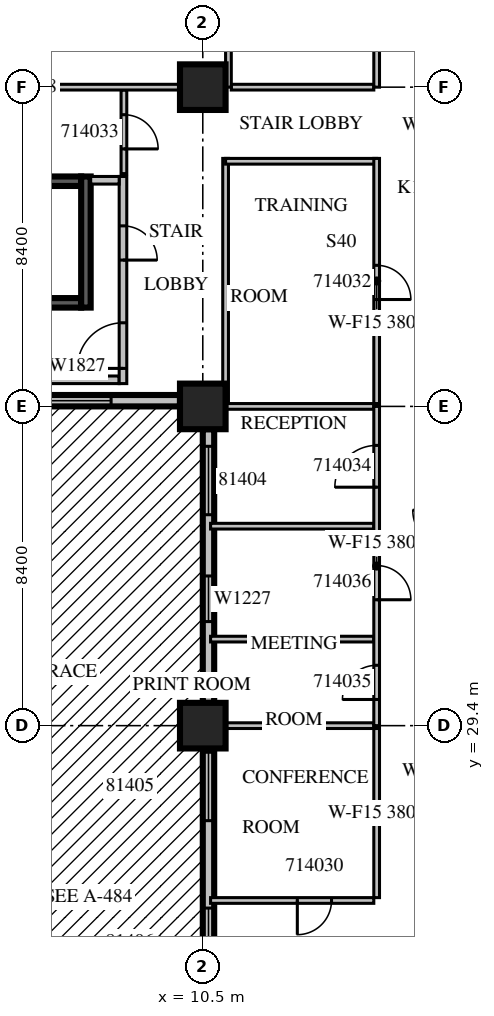
"""IFC4 building model, lengths in metres.
Left out: names, types, materials, properties, quantities, classifications, styles, units other than length and angle.
Written with IfcOpenShell. Run it as: python <this file> out.ifc"""

import sys

from ifc_helpers import new_model, si_unit, direction, frame, frame_2d, origin, origin_2d, place, context, subcontext, project, spatial, rectangle, extrude, source, transform, mapped, element, fill, save


model = new_model("IFC4")
c1 = context("Model", 3, precision=1e-05, world=origin(), true_north=direction((0.0, 1.0)))
c2 = subcontext(c1, "Body", "Model", "MODEL_VIEW")
j1 = project(units=[si_unit("LENGTHUNIT", "METRE"), si_unit("PLANEANGLEUNIT", "RADIAN")], contexts=[c1])
p1 = place(None, origin())
s1 = spatial("IfcSite", under=j1, at=p1, CompositionType="ELEMENT")
p2 = place(p1, origin())
s2 = spatial("IfcBuilding", under=s1, at=p2, CompositionType="ELEMENT")
p3 = place(p2, frame((0.0, 0.0, 69.9)))
s3 = spatial("IfcBuildingStorey", under=s2, at=p3, CompositionType="ELEMENT", Elevation=69.9)
m1 = source(origin(), c2, "Body", "SweptSolid", [
    extrude(rectangle(XDim=1.2, YDim=1.2, at=origin_2d()), origin(), (0.0, 0.0, 1.0), 4.2),
])
for number, where, z_axis, x_axis in (
    (1, (10.5, 29.4, 0.0), (0.0, 0.0, 1.0), (1.0, 0.0, 0.0)),
    (2, (10.5, 37.8, 0.0), (0.0, 0.0, 1.0), (1.0, 0.0, 0.0)),
    (3, (10.5, 46.2, 0.0), (0.0, 0.0, 1.0), (1.0, 0.0, 0.0)),
):
    element("IfcColumn", number, at=place(p3, frame(where, z_axis=z_axis, x_axis=x_axis)), inside=s3, PredefinedType="COLUMN", context=c2, shape_type="MappedRepresentation", body=[
        mapped(m1, transform((0.0, 0.0, 0.0), scale=1.0)),
    ])
m2 = source(origin(), c2, "Body", "SweptSolid", [
    extrude(rectangle(XDim=8.7, YDim=0.3, at=frame_2d((4.35, 0.0))), origin(), (0.0, 0.0, 1.0), 3.8),
])
p4 = place(p3, frame((1.2, 37.95, 0.0), z_axis=(0.0, 0.0, 1.0), x_axis=(1.0, 0.0, 0.0)))
e4 = element("IfcWall", 4, at=p4, inside=s3, PredefinedType="STANDARD", context=c2, shape_type="MappedRepresentation", body=[
    mapped(m2, transform((0.0, 0.0, 0.0), scale=1.0)),
])
m3 = source(origin(), c2, "Body", "SweptSolid", [
    extrude(rectangle(XDim=2.4, YDim=2.7, at=frame_2d((1.2, 1.35))), frame((0.0, 0.16, 0.0), z_axis=(0.0, -1.0, 0.0), x_axis=(1.0, 0.0, 0.0)), (0.0, 0.0, 1.0), 0.32),
])
p5 = place(p4, frame((0.225, 0.0, 0.6)))
e5 = element("IfcOpeningElement", 5, at=p5, cuts=e4, PredefinedType="OPENING", context=c2, shape_type="MappedRepresentation", body=[
    mapped(m3, transform((0.0, 0.0, 0.0), scale=1.0)),
])
m4 = source(origin(), c2, "Body", "SweptSolid", [
    extrude(rectangle(XDim=1.8, YDim=2.7, at=frame_2d((0.9, 1.35))), frame((0.0, 0.16, 0.0), z_axis=(0.0, -1.0, 0.0), x_axis=(1.0, 0.0, 0.0)), (0.0, 0.0, 1.0), 0.32),
])
p6 = place(p4, frame((5.088, 0.0, 0.6)))
e6 = element("IfcOpeningElement", 6, at=p6, cuts=e4, PredefinedType="OPENING", context=c2, shape_type="MappedRepresentation", body=[
    mapped(m4, transform((0.0, 0.0, 0.0), scale=1.0)),
])
m5 = source(origin(), c2, "Body", "SweptSolid", [
    extrude(rectangle(XDim=7.2, YDim=0.3, at=frame_2d((3.6, 0.0))), origin(), (0.0, 0.0, 1.0), 3.8),
])
p7 = place(p3, frame((10.65, 37.2, 0.0), z_axis=(0.0, 0.0, 1.0), x_axis=(0.0, -1.0, 0.0)))
e7 = element("IfcWall", 7, at=p7, inside=s3, PredefinedType="STANDARD", context=c2, shape_type="MappedRepresentation", body=[
    mapped(m5, transform((0.0, 0.0, 0.0), scale=1.0)),
])
m6 = source(origin(), c2, "Body", "SweptSolid", [
    extrude(rectangle(XDim=1.8, YDim=2.4, at=frame_2d((0.9, 1.2))), frame((0.0, 0.16, 0.0), z_axis=(0.0, -1.0, 0.0), x_axis=(1.0, 0.0, 0.0)), (0.0, 0.0, 1.0), 0.32),
])
p8 = place(p7, frame((0.45, 0.0, 0.0)))
e8 = element("IfcOpeningElement", 8, at=p8, cuts=e7, PredefinedType="OPENING", context=c2, shape_type="MappedRepresentation", body=[
    mapped(m6, transform((0.0, 0.0, 0.0), scale=1.0)),
])
m7 = source(origin(), c2, "Body", "SweptSolid", [
    extrude(rectangle(XDim=1.2, YDim=2.7, at=frame_2d((0.6, 1.35))), frame((0.0, 0.16, 0.0), z_axis=(0.0, -1.0, 0.0), x_axis=(1.0, 0.0, 0.0)), (0.0, 0.0, 1.0), 0.32),
])
p9 = place(p7, frame((3.861, 0.0, 0.6)))
e9 = element("IfcOpeningElement", 9, at=p9, cuts=e7, PredefinedType="OPENING", context=c2, shape_type="MappedRepresentation", body=[
    mapped(m7, transform((0.0, 0.0, 0.0), scale=1.0)),
])
m8 = source(origin(), c2, "Body", "SweptSolid", [
    extrude(rectangle(XDim=6.6, YDim=0.3, at=frame_2d((3.3, 0.0))), origin(), (0.0, 0.0, 1.0), 3.8),
])
p10 = place(p3, frame((10.65, 28.8, 0.0), z_axis=(0.0, 0.0, 1.0), x_axis=(0.0, -1.0, 0.0)))
e10 = element("IfcWall", 10, at=p10, inside=s3, PredefinedType="STANDARD", context=c2, shape_type="MappedRepresentation", body=[
    mapped(m8, transform((0.0, 0.0, 0.0), scale=1.0)),
])
p11 = place(p10, frame((0.1, 0.0, 0.0)))
e11 = element("IfcOpeningElement", 11, at=p11, cuts=e10, PredefinedType="OPENING", context=c2, shape_type="MappedRepresentation", body=[
    mapped(m6, transform((0.0, 0.0, 0.0), scale=1.0)),
])
p12 = place(p10, frame((4.2, 0.0, 0.0)))
e12 = element("IfcOpeningElement", 12, at=p12, cuts=e10, PredefinedType="OPENING", context=c2, shape_type="MappedRepresentation", body=[
    mapped(m6, transform((0.0, 0.0, 0.0), scale=1.0)),
])
m9 = source(origin(), c2, "Body", "SweptSolid", [
    extrude(rectangle(XDim=7.0, YDim=0.25, at=frame_2d((3.5, 0.0))), origin(), (0.0, 0.0, 1.0), 3.8),
])
p13 = place(p3, frame((0.3, 40.525, 0.0), z_axis=(0.0, 0.0, 1.0), x_axis=(1.0, 0.0, 0.0)))
e13 = element("IfcWall", 13, at=p13, inside=s3, PredefinedType="SOLIDWALL", context=c2, shape_type="MappedRepresentation", body=[
    mapped(m9, transform((0.0, 0.0, 0.0), scale=1.0)),
])
m10 = source(origin(), c2, "Body", "SweptSolid", [
    extrude(rectangle(XDim=1.1, YDim=2.1, at=frame_2d((0.55, 1.05))), frame((0.0, 0.135, 0.0), z_axis=(0.0, -1.0, 0.0), x_axis=(1.0, 0.0, 0.0)), (0.0, 0.0, 1.0), 0.27),
])
p14 = place(p13, frame((0.55, 0.0, 0.0)))
e14 = element("IfcOpeningElement", 14, at=p14, cuts=e13, PredefinedType="OPENING", context=c2, shape_type="MappedRepresentation", body=[
    mapped(m10, transform((0.0, 0.0, 0.0), scale=1.0)),
])
p15 = place(p3, frame((0.3, 43.725, 0.0), z_axis=(0.0, 0.0, 1.0), x_axis=(1.0, 0.0, 0.0)))
e15 = element("IfcWall", 15, at=p15, inside=s3, PredefinedType="SOLIDWALL", context=c2, shape_type="MappedRepresentation", body=[
    mapped(m9, transform((0.0, 0.0, 0.0), scale=1.0)),
])
m11 = source(origin(), c2, "Body", "SweptSolid", [
    extrude(rectangle(XDim=3.45, YDim=0.25, at=frame_2d((1.725, 0.0))), origin(), (0.0, 0.0, 1.0), 3.8),
])
p16 = place(p3, frame((7.425, 40.4, 0.0), z_axis=(0.0, 0.0, 1.0), x_axis=(0.0, 1.0, 0.0)))
e16 = element("IfcWall", 16, at=p16, inside=s3, PredefinedType="SOLIDWALL", context=c2, shape_type="MappedRepresentation", body=[
    mapped(m11, transform((0.0, 0.0, 0.0), scale=1.0)),
])
m12 = source(origin(), c2, "Body", "SweptSolid", [
    extrude(rectangle(XDim=8.0, YDim=0.2, at=frame_2d((4.0, 0.0))), origin(), (0.0, 0.0, 1.0), 3.8),
])
p17 = place(p3, frame((0.3, 38.5, 0.0), z_axis=(0.0, 0.0, 1.0), x_axis=(1.0, 0.0, 0.0)))
e17 = element("IfcWall", 17, at=p17, inside=s3, PredefinedType="PARTITIONING", context=c2, shape_type="MappedRepresentation", body=[
    mapped(m12, transform((0.0, 0.0, 0.0), scale=1.0)),
])
m13 = source(origin(), c2, "Body", "SweptSolid", [
    extrude(rectangle(XDim=5.45, YDim=0.2, at=frame_2d((2.725, 0.0))), origin(), (0.0, 0.0, 1.0), 3.8),
])
p18 = place(p3, frame((8.4, 38.4, 0.0), z_axis=(0.0, 0.0, 1.0), x_axis=(0.0, 1.0, 0.0)))
e18 = element("IfcWall", 18, at=p18, inside=s3, PredefinedType="PARTITIONING", context=c2, shape_type="MappedRepresentation", body=[
    mapped(m13, transform((0.0, 0.0, 0.0), scale=1.0)),
])
m14 = source(origin(), c2, "Body", "SweptSolid", [
    extrude(rectangle(XDim=1.2, YDim=2.1, at=frame_2d((0.6, 1.05))), frame((0.0, 0.11, 0.0), z_axis=(0.0, -1.0, 0.0), x_axis=(1.0, 0.0, 0.0)), (0.0, 0.0, 1.0), 0.22),
])
p19 = place(p18, frame((0.4, 0.0, 0.0)))
e19 = element("IfcOpeningElement", 19, at=p19, cuts=e18, PredefinedType="OPENING", context=c2, shape_type="MappedRepresentation", body=[
    mapped(m14, transform((0.0, 0.0, 0.0), scale=1.0)),
])
m15 = source(origin(), c2, "Body", "SweptSolid", [
    extrude(rectangle(XDim=0.9, YDim=2.1, at=frame_2d((0.45, 1.05))), frame((0.0, 0.11, 0.0), z_axis=(0.0, -1.0, 0.0), x_axis=(1.0, 0.0, 0.0)), (0.0, 0.0, 1.0), 0.22),
])
p20 = place(p18, frame((3.25, 0.0, 0.0)))
e20 = element("IfcOpeningElement", 20, at=p20, cuts=e18, PredefinedType="OPENING", context=c2, shape_type="MappedRepresentation", body=[
    mapped(m15, transform((0.0, 0.0, 0.0), scale=1.0)),
])
m16 = source(origin(), c2, "Body", "SweptSolid", [
    extrude(rectangle(XDim=0.75, YDim=0.2, at=frame_2d((0.375, 0.0))), origin(), (0.0, 0.0, 1.0), 3.8),
])
p21 = place(p3, frame((7.55, 43.75, 0.0), z_axis=(0.0, 0.0, 1.0), x_axis=(1.0, 0.0, 0.0)))
e21 = element("IfcWall", 21, at=p21, inside=s3, PredefinedType="PARTITIONING", context=c2, shape_type="MappedRepresentation", body=[
    mapped(m16, transform((0.0, 0.0, 0.0), scale=1.0)),
])
m17 = source(origin(), c2, "Body", "SweptSolid", [
    extrude(rectangle(XDim=4.295, YDim=0.15, at=frame_2d((2.147, 0.0))), origin(), (0.0, 0.0, 1.0), 3.8),
])
p22 = place(p3, frame((10.705, 24.8, 0.0), z_axis=(0.0, 0.0, 1.0), x_axis=(1.0, 0.0, 0.0)))
e22 = element("IfcWall", 22, at=p22, inside=s3, PredefinedType="PARTITIONING", context=c2, shape_type="MappedRepresentation", body=[
    mapped(m17, transform((0.0, 0.0, 0.0), scale=1.0)),
])
m18 = source(origin(), c2, "Body", "SweptSolid", [
    extrude(rectangle(XDim=0.9, YDim=2.1, at=frame_2d((0.45, 1.05))), frame((0.0, 0.085, 0.0), z_axis=(0.0, -1.0, 0.0), x_axis=(1.0, 0.0, 0.0)), (0.0, 0.0, 1.0), 0.17),
])
p23 = place(p22, frame((2.283, 0.0, 0.0)))
e23 = element("IfcOpeningElement", 23, at=p23, cuts=e22, PredefinedType="OPENING", context=c2, shape_type="MappedRepresentation", body=[
    mapped(m18, transform((0.0, 0.0, 0.0), scale=1.0)),
])
m19 = source(origin(), c2, "Body", "SweptSolid", [
    extrude(rectangle(XDim=4.45, YDim=0.15, at=frame_2d((2.225, 0.0))), origin(), (0.0, 0.0, 1.0), 3.8),
])
p24 = place(p3, frame((15.075, 24.875, 0.0), z_axis=(0.0, 0.0, 1.0), x_axis=(0.0, 1.0, 0.0)))
e24 = element("IfcWall", 24, at=p24, inside=s3, PredefinedType="PARTITIONING", context=c2, shape_type="MappedRepresentation", body=[
    mapped(m19, transform((0.0, 0.0, 0.0), scale=1.0)),
])
m20 = source(origin(), c2, "Body", "SweptSolid", [
    extrude(rectangle(XDim=3.901, YDim=0.15, at=frame_2d((1.95, 0.0))), origin(), (0.0, 0.0, 1.0), 3.8),
])
p25 = place(p3, frame((15.0, 29.4, 0.0), z_axis=(0.0, 0.0, 1.0), x_axis=(-1.0, 0.0, 0.0)))
e25 = element("IfcWall", 25, at=p25, inside=s3, PredefinedType="PARTITIONING", context=c2, shape_type="MappedRepresentation", body=[
    mapped(m20, transform((0.0, 0.0, 0.0), scale=1.0)),
])
m21 = source(origin(), c2, "Body", "SweptSolid", [
    extrude(rectangle(XDim=6.45, YDim=0.15, at=frame_2d((3.225, 0.0))), origin(), (0.0, 0.0, 1.0), 3.8),
])
p26 = place(p3, frame((11.1, 44.325, 0.0), z_axis=(0.0, 0.0, 1.0), x_axis=(0.0, -1.0, 0.0)))
e26 = element("IfcWall", 26, at=p26, inside=s3, PredefinedType="PARTITIONING", context=c2, shape_type="MappedRepresentation", body=[
    mapped(m21, transform((0.0, 0.0, 0.0), scale=1.0)),
])
m22 = source(origin(), c2, "Body", "SweptSolid", [
    extrude(rectangle(XDim=3.975, YDim=0.15, at=frame_2d((1.988, 0.0))), origin(), (0.0, 0.0, 1.0), 3.8),
])
p27 = place(p3, frame((15.075, 44.25, 0.0), z_axis=(0.0, 0.0, 1.0), x_axis=(-1.0, 0.0, 0.0)))
e27 = element("IfcWall", 27, at=p27, inside=s3, PredefinedType="PARTITIONING", context=c2, shape_type="MappedRepresentation", body=[
    mapped(m22, transform((0.0, 0.0, 0.0), scale=1.0)),
])
p28 = place(p3, frame((15.075, 37.875, 0.0), z_axis=(0.0, 0.0, 1.0), x_axis=(0.0, 1.0, 0.0)))
e28 = element("IfcWall", 28, at=p28, inside=s3, PredefinedType="PARTITIONING", context=c2, shape_type="MappedRepresentation", body=[
    mapped(m21, transform((0.0, 0.0, 0.0), scale=1.0)),
])
p29 = place(p28, frame((2.737, 0.0, 0.0)))
e29 = element("IfcOpeningElement", 29, at=p29, cuts=e28, PredefinedType="OPENING", context=c2, shape_type="MappedRepresentation", body=[
    mapped(m18, transform((0.0, 0.0, 0.0), scale=1.0)),
])
m23 = source(origin(), c2, "Body", "SweptSolid", [
    extrude(rectangle(XDim=2.2, YDim=0.15, at=frame_2d((1.1, 0.0))), origin(), (0.0, 0.0, 1.0), 3.8),
])
p30 = place(p3, frame((8.425, 43.925, 0.0), z_axis=(0.0, 0.0, 1.0), x_axis=(0.0, 1.0, 0.0)))
e30 = element("IfcWall", 30, at=p30, inside=s3, PredefinedType="PARTITIONING", context=c2, shape_type="MappedRepresentation", body=[
    mapped(m23, transform((0.0, 0.0, 0.0), scale=1.0)),
])
p31 = place(p30, frame((0.65, 0.0, 0.0)))
e31 = element("IfcOpeningElement", 31, at=p31, cuts=e30, PredefinedType="OPENING", context=c2, shape_type="MappedRepresentation", body=[
    mapped(m18, transform((0.0, 0.0, 0.0), scale=1.0)),
])
for number, where, z_axis, x_axis in (
    (32, (15.0, 31.677, 0.0), (0.0, 0.0, 1.0), (-1.0, 0.0, 0.0)),
    (33, (15.0, 34.648, 0.0), (0.0, 0.0, 1.0), (-1.0, 0.0, 0.0)),
):
    element("IfcWall", number, at=place(p3, frame(where, z_axis=z_axis, x_axis=x_axis)), inside=s3, PredefinedType="PARTITIONING", context=c2, shape_type="MappedRepresentation", body=[
        mapped(m17, transform((0.0, 0.0, 0.0), scale=1.0)),
    ])
p32 = place(p3, frame((15.0, 37.8, 0.0), z_axis=(0.0, 0.0, 1.0), x_axis=(-1.0, 0.0, 0.0)))
e34 = element("IfcWall", 34, at=p32, inside=s3, PredefinedType="PARTITIONING", context=c2, shape_type="MappedRepresentation", body=[
    mapped(m20, transform((0.0, 0.0, 0.0), scale=1.0)),
])
m24 = source(origin(), c2, "Body", "SweptSolid", [
    extrude(rectangle(XDim=8.702, YDim=0.15, at=frame_2d((4.351, 0.0))), origin(), (0.0, 0.0, 1.0), 3.8),
])
p33 = place(p3, frame((9.901, 46.2, 0.0), z_axis=(0.0, 0.0, 1.0), x_axis=(-1.0, 0.0, 0.0)))
e35 = element("IfcWall", 35, at=p33, inside=s3, PredefinedType="PARTITIONING", context=c2, shape_type="MappedRepresentation", body=[
    mapped(m24, transform((0.0, 0.0, 0.0), scale=1.0)),
])
m25 = source(origin(), c2, "Body", "SweptSolid", [
    extrude(rectangle(XDim=3.75, YDim=0.15, at=frame_2d((1.875, 0.0))), origin(), (0.0, 0.0, 1.0), 3.8),
])
p34 = place(p3, frame((15.0, 46.2, 0.0), z_axis=(0.0, 0.0, 1.0), x_axis=(-1.0, 0.0, 0.0)))
e36 = element("IfcWall", 36, at=p34, inside=s3, PredefinedType="PARTITIONING", context=c2, shape_type="MappedRepresentation", body=[
    mapped(m25, transform((0.0, 0.0, 0.0), scale=1.0)),
])
p35 = place(p3, frame((11.175, 46.2, 0.0), z_axis=(0.0, 0.0, 1.0), x_axis=(0.0, 1.0, 0.0)))
e37 = element("IfcWall", 37, at=p35, inside=s3, PredefinedType="PARTITIONING", context=c2, shape_type="SweptSolid", body=[
    extrude(rectangle(XDim=15.615, YDim=0.15, at=frame_2d((7.808, 0.0))), origin(), (0.0, 0.0, 1.0), 3.3),
])
p36 = place(p35, frame((2.487, 0.0, 0.0)))
e38 = element("IfcOpeningElement", 38, at=p36, cuts=e37, PredefinedType="OPENING", context=c2, shape_type="MappedRepresentation", body=[
    mapped(m18, transform((0.0, 0.0, 0.0), scale=1.0)),
])
p37 = place(p35, frame((8.367, 0.0, 0.0)))
e39 = element("IfcOpeningElement", 39, at=p37, cuts=e37, PredefinedType="OPENING", context=c2, shape_type="MappedRepresentation", body=[
    mapped(m18, transform((0.0, 0.0, 0.0), scale=1.0)),
])
p38 = place(p35, frame((13.512, 0.0, 0.0)))
e40 = element("IfcOpeningElement", 40, at=p38, cuts=e37, PredefinedType="OPENING", context=c2, shape_type="MappedRepresentation", body=[
    mapped(m18, transform((0.0, 0.0, 0.0), scale=1.0)),
])
m26 = source(origin(), c2, "Body", "SweptSolid", [
    extrude(rectangle(XDim=8.4, YDim=0.15, at=frame_2d((4.2, 0.0))), origin(), (0.0, 0.0, 1.0), 3.8),
])
p39 = place(p3, frame((15.075, 29.4, 0.0), z_axis=(0.0, 0.0, 1.0), x_axis=(0.0, 1.0, 0.0)))
e41 = element("IfcWall", 41, at=p39, inside=s3, PredefinedType="PARTITIONING", context=c2, shape_type="MappedRepresentation", body=[
    mapped(m26, transform((0.0, 0.0, 0.0), scale=1.0)),
])
m27 = source(origin(), c2, "Body", "SweptSolid", [
    extrude(rectangle(XDim=1.1, YDim=2.1, at=frame_2d((0.55, 1.05))), frame((0.0, 0.085, 0.0), z_axis=(0.0, -1.0, 0.0), x_axis=(1.0, 0.0, 0.0)), (0.0, 0.0, 1.0), 0.17),
])
p40 = place(p39, frame((6.274, 0.0, 0.0)))
e42 = element("IfcOpeningElement", 42, at=p40, cuts=e41, PredefinedType="OPENING", context=c2, shape_type="MappedRepresentation", body=[
    mapped(m27, transform((0.0, 0.0, 0.0), scale=1.0)),
])
p41 = place(p39, frame((0.689, 0.0, 0.0)))
e43 = element("IfcOpeningElement", 43, at=p41, cuts=e41, PredefinedType="OPENING", context=c2, shape_type="MappedRepresentation", body=[
    mapped(m18, transform((0.0, 0.0, 0.0), scale=1.0)),
])
p42 = place(p39, frame((3.313, 0.0, 0.0)))
e44 = element("IfcOpeningElement", 44, at=p42, cuts=e41, PredefinedType="OPENING", context=c2, shape_type="MappedRepresentation", body=[
    mapped(m18, transform((0.0, 0.0, 0.0), scale=1.0)),
])
m28 = source(origin(), c2, "Body", "SweptSolid", [
    extrude(rectangle(XDim=19.02, YDim=0.15, at=frame_2d((9.51, 0.0))), origin(), (0.0, 0.0, 1.0), 3.3),
])
p43 = place(p3, frame((15.075, 46.2, 0.0), z_axis=(0.0, 0.0, 1.0), x_axis=(0.0, 1.0, 0.0)))
e45 = element("IfcWall", 45, at=p43, inside=s3, PredefinedType="PARTITIONING", context=c2, shape_type="MappedRepresentation", body=[
    mapped(m28, transform((0.0, 0.0, 0.0), scale=1.0)),
])
m29 = source(origin(), c2, "Body", "SweptSolid", [
    extrude(rectangle(XDim=1.2, YDim=2.1, at=frame_2d((0.6, 1.05))), frame((0.0, 0.085, 0.0), z_axis=(0.0, -1.0, 0.0), x_axis=(1.0, 0.0, 0.0)), (0.0, 0.0, 1.0), 0.17),
])
p44 = place(p43, frame((7.17, 0.0, 0.0)))
e46 = element("IfcOpeningElement", 46, at=p44, cuts=e45, PredefinedType="OPENING", context=c2, shape_type="MappedRepresentation", body=[
    mapped(m29, transform((0.0, 0.0, 0.0), scale=1.0)),
])
p45 = place(p43, frame((16.767, 0.0, 0.0)))
e47 = element("IfcOpeningElement", 47, at=p45, cuts=e45, PredefinedType="OPENING", context=c2, shape_type="MappedRepresentation", body=[
    mapped(m27, transform((0.0, 0.0, 0.0), scale=1.0)),
])
m30 = source(origin(), c2, "Body", "SweptSolid", [
    extrude(rectangle(XDim=1.8, YDim=2.7, at=frame_2d((0.9, 1.35))), frame((0.0, 0.03, 0.0), z_axis=(0.0, -1.0, 0.0), x_axis=(1.0, 0.0, 0.0)), (0.0, 0.0, 1.0), 0.06),
])
p46 = place(p6, origin())
e48 = element("IfcWindow", 48, at=p46, inside=s3, PartitioningType="SINGLE_PANEL", PredefinedType="WINDOW", context=c2, shape_type="MappedRepresentation", body=[
    mapped(m30, transform((0.0, 0.0, 0.0), scale=1.0)),
])
fill(e6, e48)
m31 = source(origin(), c2, "Body", "SweptSolid", [
    extrude(rectangle(XDim=1.8, YDim=2.4, at=frame_2d((0.9, 1.2))), frame((0.0, 0.025, 0.0), z_axis=(0.0, -1.0, 0.0), x_axis=(1.0, 0.0, 0.0)), (0.0, 0.0, 1.0), 0.05),
])
p47 = place(p8, origin())
e49 = element("IfcDoor", 49, at=p47, inside=s3, OperationType="SLIDING_TO_LEFT", PredefinedType="DOOR", context=c2, shape_type="MappedRepresentation", body=[
    mapped(m31, transform((0.0, 0.0, 0.0), scale=1.0)),
])
fill(e8, e49)
p48 = place(p11, origin())
e50 = element("IfcDoor", 50, at=p48, inside=s3, OperationType="SLIDING_TO_LEFT", PredefinedType="DOOR", context=c2, shape_type="MappedRepresentation", body=[
    mapped(m31, transform((0.0, 0.0, 0.0), scale=1.0)),
])
fill(e11, e50)
p49 = place(p12, origin())
e51 = element("IfcDoor", 51, at=p49, inside=s3, OperationType="SLIDING_TO_LEFT", PredefinedType="DOOR", context=c2, shape_type="MappedRepresentation", body=[
    mapped(m31, transform((0.0, 0.0, 0.0), scale=1.0)),
])
fill(e12, e51)
m32 = source(origin(), c2, "Body", "SweptSolid", [
    extrude(rectangle(XDim=1.2, YDim=2.7, at=frame_2d((0.6, 1.35))), frame((0.0, 0.03, 0.0), z_axis=(0.0, -1.0, 0.0), x_axis=(1.0, 0.0, 0.0)), (0.0, 0.0, 1.0), 0.06),
])
p50 = place(p9, origin())
e52 = element("IfcWindow", 52, at=p50, inside=s3, PartitioningType="SINGLE_PANEL", PredefinedType="WINDOW", context=c2, shape_type="MappedRepresentation", body=[
    mapped(m32, transform((0.0, 0.0, 0.0), scale=1.0)),
])
fill(e9, e52)
m33 = source(origin(), c2, "Body", "SweptSolid", [
    extrude(rectangle(XDim=1.2, YDim=2.1, at=frame_2d((0.6, 1.05))), frame((0.0, 0.025, 0.0), z_axis=(0.0, -1.0, 0.0), x_axis=(1.0, 0.0, 0.0)), (0.0, 0.0, 1.0), 0.05),
])
p51 = place(p19, origin())
e53 = element("IfcDoor", 53, at=p51, inside=s3, OperationType="SINGLE_SWING_LEFT", PredefinedType="DOOR", context=c2, shape_type="MappedRepresentation", body=[
    mapped(m33, transform((0.0, 0.0, 0.0), scale=1.0)),
])
fill(e19, e53)
m34 = source(origin(), c2, "Body", "SweptSolid", [
    extrude(rectangle(XDim=0.9, YDim=2.1, at=frame_2d((0.45, 1.05))), frame((0.0, 0.025, 0.0), z_axis=(0.0, -1.0, 0.0), x_axis=(1.0, 0.0, 0.0)), (0.0, 0.0, 1.0), 0.05),
])
p52 = place(p20, origin())
e54 = element("IfcDoor", 54, at=p52, inside=s3, OperationType="SINGLE_SWING_RIGHT", PredefinedType="DOOR", context=c2, shape_type="MappedRepresentation", body=[
    mapped(m34, transform((0.0, 0.0, 0.0), scale=1.0)),
])
fill(e20, e54)
p53 = place(p23, origin())
e55 = element("IfcDoor", 55, at=p53, inside=s3, OperationType="SINGLE_SWING_RIGHT", PredefinedType="DOOR", context=c2, shape_type="MappedRepresentation", body=[
    mapped(m34, transform((0.0, 0.0, 0.0), scale=1.0)),
])
fill(e23, e55)
p54 = place(p29, origin())
e56 = element("IfcDoor", 56, at=p54, inside=s3, OperationType="SINGLE_SWING_RIGHT", PredefinedType="DOOR", context=c2, shape_type="MappedRepresentation", body=[
    mapped(m34, transform((0.0, 0.0, 0.0), scale=1.0)),
])
fill(e29, e56)
p55 = place(p31, origin())
e57 = element("IfcDoor", 57, at=p55, inside=s3, OperationType="SINGLE_SWING_RIGHT", PredefinedType="DOOR", context=c2, shape_type="MappedRepresentation", body=[
    mapped(m34, transform((0.0, 0.0, 0.0), scale=1.0)),
])
fill(e31, e57)
m35 = source(origin(), c2, "Body", "SweptSolid", [
    extrude(rectangle(XDim=1.1, YDim=2.1, at=frame_2d((0.55, 1.05))), frame((0.0, 0.025, 0.0), z_axis=(0.0, -1.0, 0.0), x_axis=(1.0, 0.0, 0.0)), (0.0, 0.0, 1.0), 0.05),
])
p56 = place(p40, origin())
e58 = element("IfcDoor", 58, at=p56, inside=s3, OperationType="SINGLE_SWING_LEFT", PredefinedType="DOOR", context=c2, shape_type="MappedRepresentation", body=[
    mapped(m35, transform((0.0, 0.0, 0.0), scale=1.0)),
])
fill(e42, e58)
p57 = place(p41, origin())
e59 = element("IfcDoor", 59, at=p57, inside=s3, OperationType="SINGLE_SWING_LEFT", PredefinedType="DOOR", context=c2, shape_type="MappedRepresentation", body=[
    mapped(m34, transform((0.0, 0.0, 0.0), scale=1.0)),
])
fill(e43, e59)
p58 = place(p42, origin())
e60 = element("IfcDoor", 60, at=p58, inside=s3, OperationType="SINGLE_SWING_RIGHT", PredefinedType="DOOR", context=c2, shape_type="MappedRepresentation", body=[
    mapped(m34, transform((0.0, 0.0, 0.0), scale=1.0)),
])
fill(e44, e60)
save(model, sys.argv[1])
